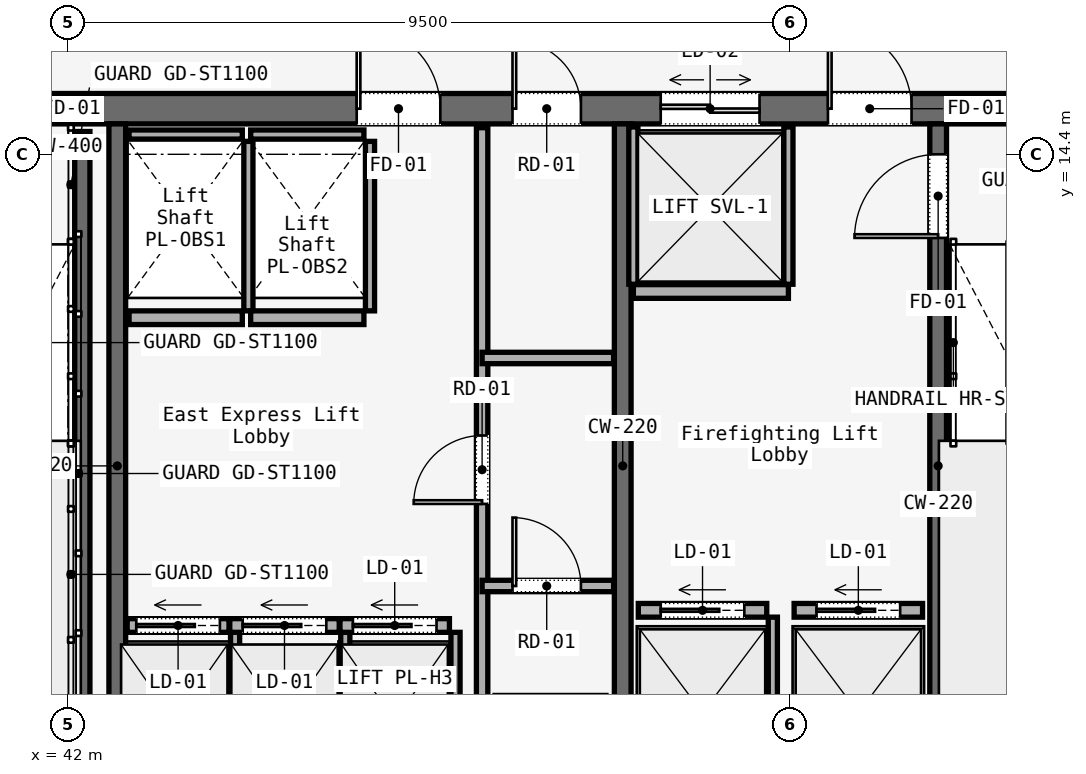
"""IFC4 building model, lengths in metres.
Left out: names, types, materials, properties, quantities, classifications, styles, units other than length and angle.
Written with IfcOpenShell. Run it as: python <this file> out.ifc"""

import sys

from ifc_helpers import new_model, si_unit, direction, frame, frame_2d, origin, place, context, subcontext, project, spatial, rectangle, extrude, element, fill, save


model = new_model("IFC4")
c1 = context("Model", 3, precision=1e-05, world=origin(), true_north=direction((0.0, 1.0)))
c2 = subcontext(c1, "Body", "Model", "MODEL_VIEW")
j1 = project(units=[si_unit("LENGTHUNIT", "METRE"), si_unit("PLANEANGLEUNIT", "RADIAN")], contexts=[c1])
p1 = place(None, origin())
s1 = spatial("IfcSite", under=j1, at=p1, CompositionType="ELEMENT")
p2 = place(p1, origin())
s2 = spatial("IfcBuilding", under=s1, at=p2, CompositionType="ELEMENT")
p3 = place(p2, frame((0.0, 0.0, 259.8)))
s3 = spatial("IfcBuildingStorey", under=s2, at=p3, CompositionType="ELEMENT", Elevation=259.8)
p4 = place(p3, frame((26.45, 15.0, 0.0), z_axis=(0.0, 0.0, 1.0), x_axis=(1.0, 0.0, 0.0)))
e1 = element("IfcWall", 1, at=p4, inside=s3, PredefinedType="SOLIDWALL", context=c2, shape_type="SweptSolid", body=[
    extrude(rectangle(XDim=31.1, YDim=0.4, at=frame_2d((15.55, 0.0))), origin(), (0.0, 0.0, 1.0), 3.58),
])
p5 = place(p4, frame((1.65, 0.0, 0.0)))
e2 = element("IfcOpeningElement", 2, at=p5, cuts=e1, PredefinedType="OPENING", context=c2, shape_type="SweptSolid", body=[
    extrude(rectangle(XDim=1.1, YDim=2.2, at=frame_2d((0.55, 1.1))), frame((0.0, 0.2, 0.0), z_axis=(0.0, -1.0, 0.0), x_axis=(1.0, 0.0, 0.0)), (0.0, 0.0, 1.0), 0.4),
])
p6 = place(p4, frame((13.65, 0.0, 0.0)))
e3 = element("IfcOpeningElement", 3, at=p6, cuts=e1, PredefinedType="OPENING", context=c2, shape_type="SweptSolid", body=[
    extrude(rectangle(XDim=1.1, YDim=2.2, at=frame_2d((0.55, 1.1))), frame((0.0, 0.2, 0.0), z_axis=(0.0, -1.0, 0.0), x_axis=(1.0, 0.0, 0.0)), (0.0, 0.0, 1.0), 0.4),
])
p7 = place(p4, frame((25.55, 0.0, 0.0)))
e4 = element("IfcOpeningElement", 4, at=p7, cuts=e1, PredefinedType="OPENING", context=c2, shape_type="SweptSolid", body=[
    extrude(rectangle(XDim=1.1, YDim=2.2, at=frame_2d((0.55, 1.1))), frame((0.0, 0.2, 0.0), z_axis=(0.0, -1.0, 0.0), x_axis=(1.0, 0.0, 0.0)), (0.0, 0.0, 1.0), 0.4),
])
p8 = place(p4, frame((19.35, 0.0, 0.0)))
e5 = element("IfcOpeningElement", 5, at=p8, cuts=e1, PredefinedType="OPENING", context=c2, shape_type="SweptSolid", body=[
    extrude(rectangle(XDim=1.1, YDim=2.2, at=frame_2d((0.55, 1.1))), frame((0.0, 0.2, 0.0), z_axis=(0.0, -1.0, 0.0), x_axis=(1.0, 0.0, 0.0)), (0.0, 0.0, 1.0), 0.4),
])
p9 = place(p4, frame((21.4, 0.0, 0.0)))
e6 = element("IfcOpeningElement", 6, at=p9, cuts=e1, PredefinedType="OPENING", context=c2, shape_type="SweptSolid", body=[
    extrude(rectangle(XDim=0.9, YDim=2.1, at=frame_2d((0.45, 1.05))), frame((0.0, 0.2, 0.0), z_axis=(0.0, -1.0, 0.0), x_axis=(1.0, 0.0, 0.0)), (0.0, 0.0, 1.0), 0.4),
])
p10 = place(p4, frame((5.54, 0.0, 0.0)))
e7 = element("IfcOpeningElement", 7, at=p10, cuts=e1, PredefinedType="OPENING", context=c2, shape_type="SweptSolid", body=[
    extrude(rectangle(XDim=0.95, YDim=2.2, at=frame_2d((0.475, 1.1))), frame((0.0, 0.2, 0.0), z_axis=(0.0, -1.0, 0.0), x_axis=(1.0, 0.0, 0.0)), (0.0, 0.0, 1.0), 0.4),
])
p11 = place(p4, frame((9.49, 0.0, 0.0)))
e8 = element("IfcOpeningElement", 8, at=p11, cuts=e1, PredefinedType="OPENING", context=c2, shape_type="SweptSolid", body=[
    extrude(rectangle(XDim=0.95, YDim=2.2, at=frame_2d((0.475, 1.1))), frame((0.0, 0.2, 0.0), z_axis=(0.0, -1.0, 0.0), x_axis=(1.0, 0.0, 0.0)), (0.0, 0.0, 1.0), 0.4),
])
p12 = place(p4, frame((23.35, 0.0, 0.0)))
e9 = element("IfcOpeningElement", 9, at=p12, cuts=e1, PredefinedType="OPENING", context=c2, shape_type="SweptSolid", body=[
    extrude(rectangle(XDim=1.3, YDim=2.3, at=frame_2d((0.65, 1.15))), frame((0.0, 0.2, 0.0), z_axis=(0.0, -1.0, 0.0), x_axis=(1.0, 0.0, 0.0)), (0.0, 0.0, 1.0), 0.4),
])
for number, where, z_axis, x_axis in (
    (10, (42.65, 5.8, 0.0), (0.0, 0.0, 1.0), (0.0, 1.0, 0.0)),
    (11, (49.3, 5.8, 0.0), (0.0, 0.0, 1.0), (0.0, 1.0, 0.0)),
):
    element("IfcWall", number, at=place(p3, frame(where, z_axis=z_axis, x_axis=x_axis)), inside=s3, PredefinedType="SOLIDWALL", context=c2, shape_type="SweptSolid", body=[
        extrude(rectangle(XDim=9.0, YDim=0.22, at=frame_2d((4.5, 0.0))), origin(), (0.0, 0.0, 1.0), 3.58),
    ])
p13 = place(p3, frame((53.45, 5.8, 0.0), z_axis=(0.0, 0.0, 1.0), x_axis=(0.0, 1.0, 0.0)))
e12 = element("IfcWall", 12, at=p13, inside=s3, PredefinedType="SOLIDWALL", context=c2, shape_type="SweptSolid", body=[
    extrude(rectangle(XDim=9.0, YDim=0.22, at=frame_2d((4.5, 0.0))), origin(), (0.0, 0.0, 1.0), 3.58),
])
p14 = place(p13, frame((7.5, 0.0, 0.0)))
e13 = element("IfcOpeningElement", 13, at=p14, cuts=e12, PredefinedType="OPENING", context=c2, shape_type="SweptSolid", body=[
    extrude(rectangle(XDim=1.1, YDim=2.2, at=frame_2d((0.55, 1.1))), frame((0.0, 0.11, 0.0), z_axis=(0.0, -1.0, 0.0), x_axis=(1.0, 0.0, 0.0)), (0.0, 0.0, 1.0), 0.22),
])
p15 = place(p3, frame((42.19, 14.7, 0.0), z_axis=(0.0, 0.0, 1.0), x_axis=(0.0, -1.0, 0.0)))
e14 = element("IfcWall", 14, at=p15, inside=s3, PredefinedType="SOLIDWALL", context=c2, shape_type="SweptSolid", body=[
    extrude(rectangle(XDim=7.65, YDim=0.2, at=frame_2d((3.825, 0.0))), origin(), (0.0, 0.0, 1.0), 3.8),
])
p16 = place(p3, frame((47.45, 5.9, 0.0), z_axis=(0.0, 0.0, 1.0), x_axis=(0.0, 1.0, 0.0)))
e15 = element("IfcWall", 15, at=p16, inside=s3, PredefinedType="PARTITIONING", context=c2, shape_type="SweptSolid", body=[
    extrude(rectangle(XDim=8.85, YDim=0.15, at=frame_2d((4.425, 0.0))), origin(), (0.0, 0.0, 1.0), 3.01),
])
p17 = place(p16, frame((3.9, 0.0, 0.0)))
e16 = element("IfcOpeningElement", 16, at=p17, cuts=e15, PredefinedType="OPENING", context=c2, shape_type="SweptSolid", body=[
    extrude(rectangle(XDim=0.9, YDim=2.1, at=frame_2d((0.45, 1.05))), frame((0.0, 0.075, 0.0), z_axis=(0.0, -1.0, 0.0), x_axis=(1.0, 0.0, 0.0)), (0.0, 0.0, 1.0), 0.15),
])
p18 = place(p3, frame((47.45, 8.72, 0.0), z_axis=(0.0, 0.0, 1.0), x_axis=(1.0, 0.0, 0.0)))
e17 = element("IfcWall", 17, at=p18, inside=s3, PredefinedType="PARTITIONING", context=c2, shape_type="SweptSolid", body=[
    extrude(rectangle(XDim=1.73, YDim=0.15, at=frame_2d((0.865, 0.0))), origin(), (0.0, 0.0, 1.0), 3.01),
])
p19 = place(p18, frame((0.4, 0.0, 0.0)))
e18 = element("IfcOpeningElement", 18, at=p19, cuts=e17, PredefinedType="OPENING", context=c2, shape_type="SweptSolid", body=[
    extrude(rectangle(XDim=0.9, YDim=2.1, at=frame_2d((0.45, 1.05))), frame((0.0, 0.075, 0.0), z_axis=(0.0, -1.0, 0.0), x_axis=(1.0, 0.0, 0.0)), (0.0, 0.0, 1.0), 0.15),
])
p20 = place(p3, frame((47.45, 11.72, 0.0), z_axis=(0.0, 0.0, 1.0), x_axis=(1.0, 0.0, 0.0)))
e19 = element("IfcWall", 19, at=p20, inside=s3, PredefinedType="PARTITIONING", context=c2, shape_type="SweptSolid", body=[
    extrude(rectangle(XDim=1.73, YDim=0.15, at=frame_2d((0.865, 0.0))), origin(), (0.0, 0.0, 1.0), 3.01),
])
p21 = place(p3, frame((42.78, 8.2, 0.0), z_axis=(0.0, 0.0, 1.0), x_axis=(1.0, 0.0, 0.0)))
e20 = element("IfcWall", 20, at=p21, inside=s3, PredefinedType="SOLIDWALL", context=c2, shape_type="SweptSolid", body=[
    extrude(rectangle(XDim=1.34, YDim=0.18, at=frame_2d((0.67, 0.0))), origin(), (0.0, 0.0, 1.0), 3.01),
])
p22 = place(p21, frame((0.12, 0.0, 0.0)))
e21 = element("IfcOpeningElement", 21, at=p22, cuts=e20, PredefinedType="OPENING", context=c2, shape_type="SweptSolid", body=[
    extrude(rectangle(XDim=1.1, YDim=2.2, at=frame_2d((0.55, 1.1))), frame((0.0, 0.09, 0.0), z_axis=(0.0, -1.0, 0.0), x_axis=(1.0, 0.0, 0.0)), (0.0, 0.0, 1.0), 0.18),
])
p23 = place(p3, frame((44.2, 5.93, 0.0), z_axis=(0.0, 0.0, 1.0), x_axis=(0.0, 1.0, 0.0)))
e22 = element("IfcWall", 22, at=p23, inside=s3, PredefinedType="SOLIDWALL", context=c2, shape_type="SweptSolid", body=[
    extrude(rectangle(XDim=2.18, YDim=0.12, at=frame_2d((1.09, 0.0))), origin(), (0.0, 0.0, 1.0), 3.01),
])
p24 = place(p3, frame((44.13, 8.2, 0.0), z_axis=(0.0, 0.0, 1.0), x_axis=(1.0, 0.0, 0.0)))
e23 = element("IfcWall", 23, at=p24, inside=s3, PredefinedType="SOLIDWALL", context=c2, shape_type="SweptSolid", body=[
    extrude(rectangle(XDim=1.44, YDim=0.18, at=frame_2d((0.72, 0.0))), origin(), (0.0, 0.0, 1.0), 3.01),
])
p25 = place(p24, frame((0.17, 0.0, 0.0)))
e24 = element("IfcOpeningElement", 24, at=p25, cuts=e23, PredefinedType="OPENING", context=c2, shape_type="SweptSolid", body=[
    extrude(rectangle(XDim=1.1, YDim=2.2, at=frame_2d((0.55, 1.1))), frame((0.0, 0.09, 0.0), z_axis=(0.0, -1.0, 0.0), x_axis=(1.0, 0.0, 0.0)), (0.0, 0.0, 1.0), 0.18),
])
p26 = place(p3, frame((45.65, 5.93, 0.0), z_axis=(0.0, 0.0, 1.0), x_axis=(0.0, 1.0, 0.0)))
e25 = element("IfcWall", 25, at=p26, inside=s3, PredefinedType="SOLIDWALL", context=c2, shape_type="SweptSolid", body=[
    extrude(rectangle(XDim=2.18, YDim=0.12, at=frame_2d((1.09, 0.0))), origin(), (0.0, 0.0, 1.0), 3.01),
])
p27 = place(p3, frame((45.58, 8.2, 0.0), z_axis=(0.0, 0.0, 1.0), x_axis=(1.0, 0.0, 0.0)))
e26 = element("IfcWall", 26, at=p27, inside=s3, PredefinedType="SOLIDWALL", context=c2, shape_type="SweptSolid", body=[
    extrude(rectangle(XDim=1.44, YDim=0.18, at=frame_2d((0.72, 0.0))), origin(), (0.0, 0.0, 1.0), 3.01),
])
p28 = place(p27, frame((0.17, 0.0, 0.0)))
e27 = element("IfcOpeningElement", 27, at=p28, cuts=e26, PredefinedType="OPENING", context=c2, shape_type="SweptSolid", body=[
    extrude(rectangle(XDim=1.1, YDim=2.2, at=frame_2d((0.55, 1.1))), frame((0.0, 0.09, 0.0), z_axis=(0.0, -1.0, 0.0), x_axis=(1.0, 0.0, 0.0)), (0.0, 0.0, 1.0), 0.18),
])
p29 = place(p3, frame((47.1, 5.93, 0.0), z_axis=(0.0, 0.0, 1.0), x_axis=(0.0, 1.0, 0.0)))
e28 = element("IfcWall", 28, at=p29, inside=s3, PredefinedType="SOLIDWALL", context=c2, shape_type="SweptSolid", body=[
    extrude(rectangle(XDim=2.18, YDim=0.12, at=frame_2d((1.09, 0.0))), origin(), (0.0, 0.0, 1.0), 3.01),
])
p30 = place(p3, frame((42.805, 12.25, 0.0), z_axis=(0.0, 0.0, 1.0), x_axis=(1.0, 0.0, 0.0)))
e29 = element("IfcWall", 29, at=p30, inside=s3, PredefinedType="SOLIDWALL", context=c2, shape_type="SweptSolid", body=[
    extrude(rectangle(XDim=1.49, YDim=0.18, at=frame_2d((0.745, 0.0))), origin(), (0.0, 0.0, 1.0), 3.01),
])
p31 = place(p3, frame((42.805, 14.66, 0.0), z_axis=(0.0, 0.0, 1.0), x_axis=(1.0, 0.0, 0.0)))
e30 = element("IfcWall", 30, at=p31, inside=s3, PredefinedType="SOLIDWALL", context=c2, shape_type="SweptSolid", body=[
    extrude(rectangle(XDim=1.49, YDim=0.12, at=frame_2d((0.745, 0.0))), origin(), (0.0, 0.0, 1.0), 3.01),
])
p32 = place(p3, frame((44.375, 12.34, 0.0), z_axis=(0.0, 0.0, 1.0), x_axis=(0.0, 1.0, 0.0)))
e31 = element("IfcWall", 31, at=p32, inside=s3, PredefinedType="SOLIDWALL", context=c2, shape_type="SweptSolid", body=[
    extrude(rectangle(XDim=2.23, YDim=0.12, at=frame_2d((1.115, 0.0))), origin(), (0.0, 0.0, 1.0), 3.01),
])
p33 = place(p3, frame((44.405, 12.25, 0.0), z_axis=(0.0, 0.0, 1.0), x_axis=(1.0, 0.0, 0.0)))
e32 = element("IfcWall", 32, at=p33, inside=s3, PredefinedType="SOLIDWALL", context=c2, shape_type="SweptSolid", body=[
    extrude(rectangle(XDim=1.49, YDim=0.18, at=frame_2d((0.745, 0.0))), origin(), (0.0, 0.0, 1.0), 3.01),
])
p34 = place(p3, frame((44.405, 14.66, 0.0), z_axis=(0.0, 0.0, 1.0), x_axis=(1.0, 0.0, 0.0)))
e33 = element("IfcWall", 33, at=p34, inside=s3, PredefinedType="SOLIDWALL", context=c2, shape_type="SweptSolid", body=[
    extrude(rectangle(XDim=1.49, YDim=0.12, at=frame_2d((0.745, 0.0))), origin(), (0.0, 0.0, 1.0), 3.01),
])
p35 = place(p3, frame((45.975, 12.34, 0.0), z_axis=(0.0, 0.0, 1.0), x_axis=(0.0, 1.0, 0.0)))
e34 = element("IfcWall", 34, at=p35, inside=s3, PredefinedType="SOLIDWALL", context=c2, shape_type="SweptSolid", body=[
    extrude(rectangle(XDim=2.23, YDim=0.12, at=frame_2d((1.115, 0.0))), origin(), (0.0, 0.0, 1.0), 3.01),
])
p36 = place(p3, frame((49.505, 8.4, 0.0), z_axis=(0.0, 0.0, 1.0), x_axis=(1.0, 0.0, 0.0)))
e35 = element("IfcWall", 35, at=p36, inside=s3, PredefinedType="SOLIDWALL", context=c2, shape_type="SweptSolid", body=[
    extrude(rectangle(XDim=1.69, YDim=0.18, at=frame_2d((0.845, 0.0))), origin(), (0.0, 0.0, 1.0), 3.01),
])
p37 = place(p36, frame((0.295, 0.0, 0.0)))
e36 = element("IfcOpeningElement", 36, at=p37, cuts=e35, PredefinedType="OPENING", context=c2, shape_type="SweptSolid", body=[
    extrude(rectangle(XDim=1.1, YDim=2.2, at=frame_2d((0.55, 1.1))), frame((0.0, 0.09, 0.0), z_axis=(0.0, -1.0, 0.0), x_axis=(1.0, 0.0, 0.0)), (0.0, 0.0, 1.0), 0.18),
])
p38 = place(p3, frame((51.275, 5.93, 0.0), z_axis=(0.0, 0.0, 1.0), x_axis=(0.0, 1.0, 0.0)))
e37 = element("IfcWall", 37, at=p38, inside=s3, PredefinedType="SOLIDWALL", context=c2, shape_type="SweptSolid", body=[
    extrude(rectangle(XDim=2.38, YDim=0.12, at=frame_2d((1.19, 0.0))), origin(), (0.0, 0.0, 1.0), 3.01),
])
p39 = place(p3, frame((51.555, 8.4, 0.0), z_axis=(0.0, 0.0, 1.0), x_axis=(1.0, 0.0, 0.0)))
e38 = element("IfcWall", 38, at=p39, inside=s3, PredefinedType="SOLIDWALL", context=c2, shape_type="SweptSolid", body=[
    extrude(rectangle(XDim=1.69, YDim=0.18, at=frame_2d((0.845, 0.0))), origin(), (0.0, 0.0, 1.0), 3.01),
])
p40 = place(p39, frame((0.295, 0.0, 0.0)))
e39 = element("IfcOpeningElement", 39, at=p40, cuts=e38, PredefinedType="OPENING", context=c2, shape_type="SweptSolid", body=[
    extrude(rectangle(XDim=1.1, YDim=2.2, at=frame_2d((0.55, 1.1))), frame((0.0, 0.09, 0.0), z_axis=(0.0, -1.0, 0.0), x_axis=(1.0, 0.0, 0.0)), (0.0, 0.0, 1.0), 0.18),
])
p41 = place(p3, frame((49.44, 12.595, 0.0), z_axis=(0.0, 0.0, 1.0), x_axis=(1.0, 0.0, 0.0)))
e40 = element("IfcWall", 40, at=p41, inside=s3, PredefinedType="SOLIDWALL", context=c2, shape_type="SweptSolid", body=[
    extrude(rectangle(XDim=2.04, YDim=0.18, at=frame_2d((1.02, 0.0))), origin(), (0.0, 0.0, 1.0), 3.01),
])
for number, where, z_axis, x_axis in (
    (41, (49.44, 12.69, 0.0), (0.0, 0.0, 1.0), (0.0, 1.0, 0.0)),
    (42, (51.48, 12.69, 0.0), (0.0, 0.0, 1.0), (0.0, 1.0, 0.0)),
):
    element("IfcWall", number, at=place(p3, frame(where, z_axis=z_axis, x_axis=x_axis)), inside=s3, PredefinedType="SOLIDWALL", context=c2, shape_type="SweptSolid", body=[
        extrude(rectangle(XDim=2.07, YDim=0.12, at=frame_2d((1.035, 0.0))), origin(), (0.0, 0.0, 1.0), 3.01),
    ])
p42 = place(p7, origin())
e43 = element("IfcDoor", 43, at=p42, inside=s3, OperationType="SINGLE_SWING_RIGHT", PredefinedType="DOOR", context=c2, shape_type="SweptSolid", body=[
    extrude(rectangle(XDim=1.1, YDim=2.2, at=frame_2d((0.55, 1.1))), frame((0.0, 0.025, 0.0), z_axis=(0.0, -1.0, 0.0), x_axis=(1.0, 0.0, 0.0)), (0.0, 0.0, 1.0), 0.05),
])
fill(e4, e43)
p43 = place(p8, origin())
e44 = element("IfcDoor", 44, at=p43, inside=s3, OperationType="SINGLE_SWING_LEFT", PredefinedType="DOOR", context=c2, shape_type="SweptSolid", body=[
    extrude(rectangle(XDim=1.1, YDim=2.2, at=frame_2d((0.55, 1.1))), frame((0.0, 0.025, 0.0), z_axis=(0.0, -1.0, 0.0), x_axis=(1.0, 0.0, 0.0)), (0.0, 0.0, 1.0), 0.05),
])
fill(e5, e44)
p44 = place(p9, origin())
e45 = element("IfcDoor", 45, at=p44, inside=s3, OperationType="SINGLE_SWING_LEFT", PredefinedType="DOOR", context=c2, shape_type="SweptSolid", body=[
    extrude(rectangle(XDim=0.9, YDim=2.1, at=frame_2d((0.45, 1.05))), frame((0.0, 0.025, 0.0), z_axis=(0.0, -1.0, 0.0), x_axis=(1.0, 0.0, 0.0)), (0.0, 0.0, 1.0), 0.05),
])
fill(e6, e45)
p45 = place(p14, origin())
e46 = element("IfcDoor", 46, at=p45, inside=s3, OperationType="SINGLE_SWING_LEFT", PredefinedType="DOOR", context=c2, shape_type="SweptSolid", body=[
    extrude(rectangle(XDim=1.1, YDim=2.2, at=frame_2d((0.55, 1.1))), frame((0.0, 0.025, 0.0), z_axis=(0.0, -1.0, 0.0), x_axis=(1.0, 0.0, 0.0)), (0.0, 0.0, 1.0), 0.05),
])
fill(e13, e46)
p46 = place(p17, origin())
e47 = element("IfcDoor", 47, at=p46, inside=s3, OperationType="SINGLE_SWING_LEFT", PredefinedType="DOOR", context=c2, shape_type="SweptSolid", body=[
    extrude(rectangle(XDim=0.9, YDim=2.1, at=frame_2d((0.45, 1.05))), frame((0.0, 0.025, 0.0), z_axis=(0.0, -1.0, 0.0), x_axis=(1.0, 0.0, 0.0)), (0.0, 0.0, 1.0), 0.05),
])
fill(e16, e47)
p47 = place(p19, origin())
e48 = element("IfcDoor", 48, at=p47, inside=s3, OperationType="SINGLE_SWING_RIGHT", PredefinedType="DOOR", context=c2, shape_type="SweptSolid", body=[
    extrude(rectangle(XDim=0.9, YDim=2.1, at=frame_2d((0.45, 1.05))), frame((0.0, 0.025, 0.0), z_axis=(0.0, -1.0, 0.0), x_axis=(1.0, 0.0, 0.0)), (0.0, 0.0, 1.0), 0.05),
])
fill(e18, e48)
p48 = place(p22, origin())
e49 = element("IfcDoor", 49, at=p48, inside=s3, OperationType="SLIDING_TO_LEFT", PredefinedType="DOOR", context=c2, shape_type="SweptSolid", body=[
    extrude(rectangle(XDim=1.1, YDim=2.2, at=frame_2d((0.55, 1.1))), frame((0.0, 0.025, 0.0), z_axis=(0.0, -1.0, 0.0), x_axis=(1.0, 0.0, 0.0)), (0.0, 0.0, 1.0), 0.05),
])
fill(e21, e49)
p49 = place(p25, origin())
e50 = element("IfcDoor", 50, at=p49, inside=s3, OperationType="SLIDING_TO_LEFT", PredefinedType="DOOR", context=c2, shape_type="SweptSolid", body=[
    extrude(rectangle(XDim=1.1, YDim=2.2, at=frame_2d((0.55, 1.1))), frame((0.0, 0.025, 0.0), z_axis=(0.0, -1.0, 0.0), x_axis=(1.0, 0.0, 0.0)), (0.0, 0.0, 1.0), 0.05),
])
fill(e24, e50)
p50 = place(p28, origin())
e51 = element("IfcDoor", 51, at=p50, inside=s3, OperationType="SLIDING_TO_LEFT", PredefinedType="DOOR", context=c2, shape_type="SweptSolid", body=[
    extrude(rectangle(XDim=1.1, YDim=2.2, at=frame_2d((0.55, 1.1))), frame((0.0, 0.025, 0.0), z_axis=(0.0, -1.0, 0.0), x_axis=(1.0, 0.0, 0.0)), (0.0, 0.0, 1.0), 0.05),
])
fill(e27, e51)
p51 = place(p37, origin())
e52 = element("IfcDoor", 52, at=p51, inside=s3, OperationType="SLIDING_TO_LEFT", PredefinedType="DOOR", context=c2, shape_type="SweptSolid", body=[
    extrude(rectangle(XDim=1.1, YDim=2.2, at=frame_2d((0.55, 1.1))), frame((0.0, 0.025, 0.0), z_axis=(0.0, -1.0, 0.0), x_axis=(1.0, 0.0, 0.0)), (0.0, 0.0, 1.0), 0.05),
])
fill(e36, e52)
p52 = place(p40, origin())
e53 = element("IfcDoor", 53, at=p52, inside=s3, OperationType="SLIDING_TO_LEFT", PredefinedType="DOOR", context=c2, shape_type="SweptSolid", body=[
    extrude(rectangle(XDim=1.1, YDim=2.2, at=frame_2d((0.55, 1.1))), frame((0.0, 0.025, 0.0), z_axis=(0.0, -1.0, 0.0), x_axis=(1.0, 0.0, 0.0)), (0.0, 0.0, 1.0), 0.05),
])
fill(e39, e53)
p53 = place(p12, origin())
e54 = element("IfcDoor", 54, at=p53, inside=s3, OperationType="DOUBLE_DOOR_SLIDING", PredefinedType="DOOR", context=c2, shape_type="SweptSolid", body=[
    extrude(rectangle(XDim=1.3, YDim=2.3, at=frame_2d((0.65, 1.15))), frame((0.0, 0.025, 0.0), z_axis=(0.0, -1.0, 0.0), x_axis=(1.0, 0.0, 0.0)), (0.0, 0.0, 1.0), 0.05),
])
fill(e9, e54)
save(model, sys.argv[1])
